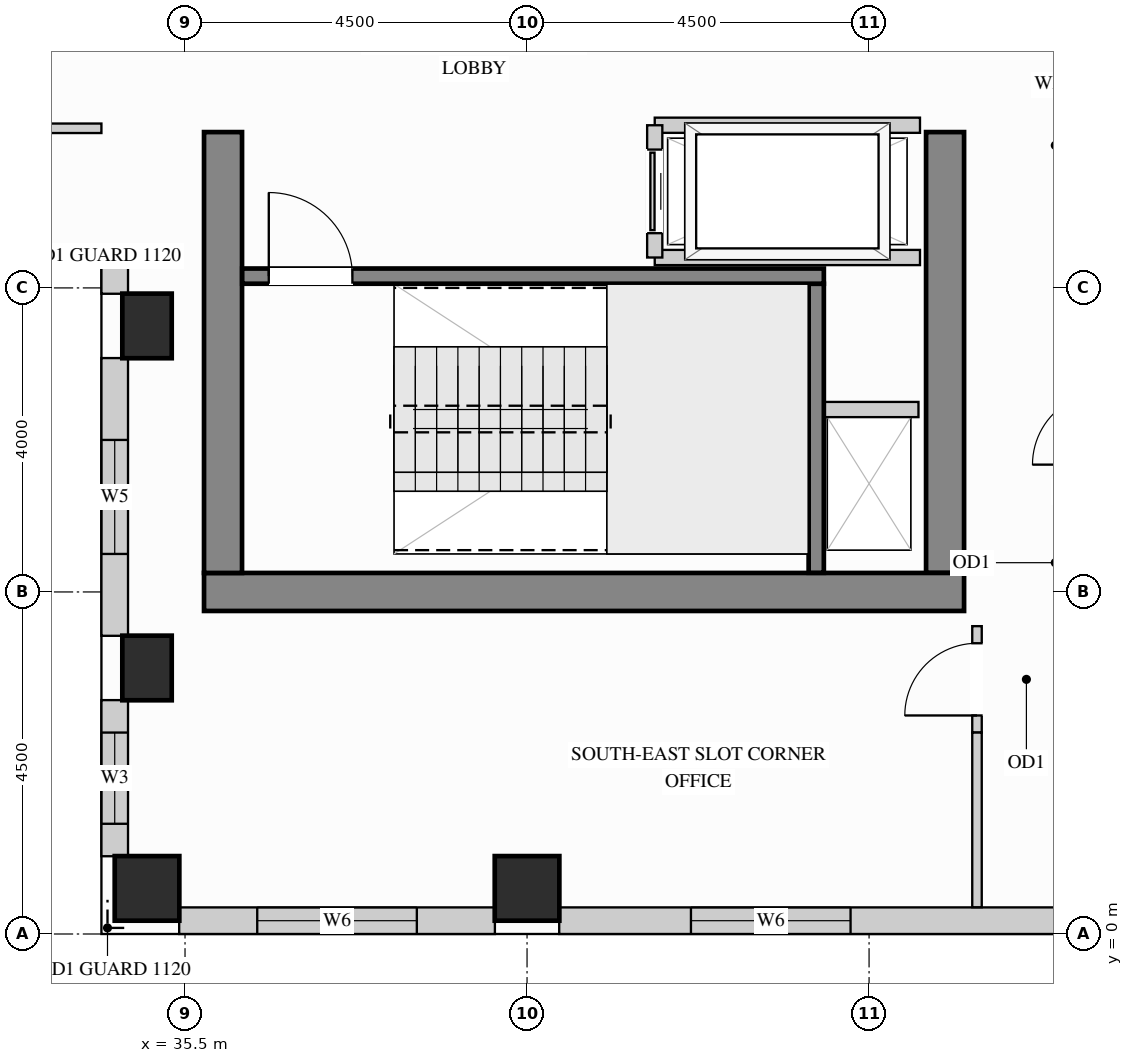
"""IFC4 building model, lengths in metres.
Left out: names, types, materials, properties, quantities, classifications, styles, units other than length and angle.
Written with IfcOpenShell. Run it as: python <this file> out.ifc"""

import sys

from ifc_helpers import new_model, si_unit, direction, frame, frame_2d, origin, origin_2d, place, context, subcontext, project, spatial, rectangle, extrude, source, transform, mapped, element, fill, save


model = new_model("IFC4")
c1 = context("Model", 3, precision=1e-05, world=origin(), true_north=direction((0.0, 1.0)))
c2 = subcontext(c1, "Body", "Model", "MODEL_VIEW")
j1 = project(units=[si_unit("LENGTHUNIT", "METRE"), si_unit("PLANEANGLEUNIT", "RADIAN")], contexts=[c1])
p1 = place(None, origin())
s1 = spatial("IfcSite", under=j1, at=p1, CompositionType="ELEMENT")
p2 = place(p1, origin())
s2 = spatial("IfcBuilding", under=s1, at=p2, CompositionType="ELEMENT")
p3 = place(p2, frame((0.0, 0.0, 244.8)))
s3 = spatial("IfcBuildingStorey", under=s2, at=p3, CompositionType="ELEMENT", Elevation=244.8)
m1 = source(origin(), c2, "Body", "SweptSolid", [
    extrude(rectangle(XDim=0.65, YDim=0.85, at=origin_2d()), origin(), (0.0, 0.0, 1.0), 3.4),
])
for number, where, z_axis, x_axis in (
    (1, (35.0, 3.5, 0.0), (0.0, 0.0, 1.0), (1.0, 0.0, 0.0)),
    (2, (35.0, 8.0, 0.0), (0.0, 0.0, 1.0), (1.0, 0.0, 0.0)),
):
    element("IfcColumn", number, at=place(p3, frame(where, z_axis=z_axis, x_axis=x_axis)), inside=s3, PredefinedType="COLUMN", context=c2, shape_type="MappedRepresentation", body=[
        mapped(m1, transform((0.0, 0.0, 0.0), x_axis=(1.0, 0.0, 0.0), y_axis=(0.0, 1.0, 0.0), z_axis=(0.0, 0.0, 1.0))),
    ])
m2 = source(origin(), c2, "Body", "SweptSolid", [
    extrude(rectangle(XDim=0.85, YDim=0.85, at=origin_2d()), origin(), (0.0, 0.0, 1.0), 3.4),
])
for number, where, z_axis, x_axis in (
    (3, (35.0, 0.6, 0.0), (0.0, 0.0, 1.0), (1.0, 0.0, 0.0)),
    (4, (40.0, 0.6, 0.0), (0.0, 0.0, 1.0), (1.0, 0.0, 0.0)),
):
    element("IfcColumn", number, at=place(p3, frame(where, z_axis=z_axis, x_axis=x_axis)), inside=s3, PredefinedType="COLUMN", context=c2, shape_type="MappedRepresentation", body=[
        mapped(m2, transform((0.0, 0.0, 0.0), x_axis=(1.0, 0.0, 0.0), y_axis=(0.0, 1.0, 0.0), z_axis=(0.0, 0.0, 1.0))),
    ])
m3 = source(origin(), c2, "Body", "SweptSolid", [
    extrude(rectangle(XDim=5.8, YDim=0.5, at=frame_2d((2.9, 0.0))), origin(), (0.0, 0.0, 1.0), 3.4),
])
p4 = place(p3, frame((45.5, 4.75, 0.0), z_axis=(0.0, 0.0, 1.0), x_axis=(0.0, 1.0, 0.0)))
e5 = element("IfcWall", 5, at=p4, inside=s3, PredefinedType="SHEAR", context=c2, shape_type="MappedRepresentation", body=[
    mapped(m3, transform((0.0, 0.0, 0.0), x_axis=(1.0, 0.0, 0.0), y_axis=(0.0, 1.0, 0.0), z_axis=(0.0, 0.0, 1.0))),
])
m4 = source(origin(), c2, "Body", "SweptSolid", [
    extrude(rectangle(XDim=10.0, YDim=0.5, at=frame_2d((5.0, 0.0))), origin(), (0.0, 0.0, 1.0), 3.4),
])
p5 = place(p3, frame((35.75, 4.5, 0.0), z_axis=(0.0, 0.0, 1.0), x_axis=(1.0, 0.0, 0.0)))
e6 = element("IfcWall", 6, at=p5, inside=s3, PredefinedType="SHEAR", context=c2, shape_type="MappedRepresentation", body=[
    mapped(m4, transform((0.0, 0.0, 0.0), x_axis=(1.0, 0.0, 0.0), y_axis=(0.0, 1.0, 0.0), z_axis=(0.0, 0.0, 1.0))),
])
p6 = place(p3, frame((36.0, 4.75, 0.0), z_axis=(0.0, 0.0, 1.0), x_axis=(0.0, 1.0, 0.0)))
e7 = element("IfcWall", 7, at=p6, inside=s3, PredefinedType="SHEAR", context=c2, shape_type="MappedRepresentation", body=[
    mapped(m3, transform((0.0, 0.0, 0.0), x_axis=(1.0, 0.0, 0.0), y_axis=(0.0, 1.0, 0.0), z_axis=(0.0, 0.0, 1.0))),
])
m5 = source(origin(), c2, "Body", "SweptSolid", [
    extrude(rectangle(XDim=0.379, YDim=0.35, at=frame_2d((0.189, 0.0))), origin(), (0.0, 0.0, 1.0), 3.385),
])
p7 = place(p3, frame((34.575, 8.802, 0.0), z_axis=(0.0, 0.0, 1.0), x_axis=(0.0, -1.0, 0.0)))
e8 = element("IfcWall", 8, at=p7, inside=s3, PredefinedType="SOLIDWALL", context=c2, shape_type="MappedRepresentation", body=[
    mapped(m5, transform((0.0, 0.0, 0.0), x_axis=(1.0, 0.0, 0.0), y_axis=(0.0, 1.0, 0.0), z_axis=(0.0, 0.0, 1.0))),
])
p8 = place(p3, frame((34.575, 7.577, 0.0), z_axis=(0.0, 0.0, 1.0), x_axis=(0.0, -1.0, 0.0)))
e9 = element("IfcWall", 9, at=p8, inside=s3, PredefinedType="SOLIDWALL", context=c2, shape_type="SweptSolid", body=[
    extrude(rectangle(XDim=3.654, YDim=0.35, at=frame_2d((1.827, 0.0))), origin(), (0.0, 0.0, 1.0), 3.385),
])
p9 = place(p8, frame((1.077, 0.0, 0.78)))
e10 = element("IfcOpeningElement", 10, at=p9, cuts=e9, PredefinedType="OPENING", context=c2, shape_type="SweptSolid", body=[
    extrude(rectangle(XDim=1.5, YDim=2.0, at=frame_2d((0.75, 1.0))), frame((0.0, 0.185, 0.0), z_axis=(0.0, -1.0, 0.0), x_axis=(1.0, 0.0, 0.0)), (0.0, 0.0, 1.0), 0.37),
])
p10 = place(p3, frame((34.575, 3.077, 0.0), z_axis=(0.0, 0.0, 1.0), x_axis=(0.0, -1.0, 0.0)))
e11 = element("IfcWall", 11, at=p10, inside=s3, PredefinedType="SOLIDWALL", context=c2, shape_type="SweptSolid", body=[
    extrude(rectangle(XDim=2.054, YDim=0.35, at=frame_2d((1.027, 0.0))), origin(), (0.0, 0.0, 1.0), 3.385),
])
p11 = place(p10, frame((0.427, 0.0, 0.78)))
e12 = element("IfcOpeningElement", 12, at=p11, cuts=e11, PredefinedType="OPENING", context=c2, shape_type="SweptSolid", body=[
    extrude(rectangle(XDim=1.2, YDim=2.0, at=frame_2d((0.6, 1.0))), frame((0.0, 0.185, 0.0), z_axis=(0.0, -1.0, 0.0), x_axis=(1.0, 0.0, 0.0)), (0.0, 0.0, 1.0), 0.37),
])
p12 = place(p3, frame((35.423, 0.175, 0.0), z_axis=(0.0, 0.0, 1.0), x_axis=(1.0, 0.0, 0.0)))
e13 = element("IfcWall", 13, at=p12, inside=s3, PredefinedType="SOLIDWALL", context=c2, shape_type="SweptSolid", body=[
    extrude(rectangle(XDim=4.154, YDim=0.35, at=frame_2d((2.077, 0.0))), origin(), (0.0, 0.0, 1.0), 3.385),
])
p13 = place(p12, frame((1.027, 0.0, 0.78)))
e14 = element("IfcOpeningElement", 14, at=p13, cuts=e13, PredefinedType="OPENING", context=c2, shape_type="SweptSolid", body=[
    extrude(rectangle(XDim=2.1, YDim=2.25, at=frame_2d((1.05, 1.125))), frame((0.0, 0.185, 0.0), z_axis=(0.0, -1.0, 0.0), x_axis=(1.0, 0.0, 0.0)), (0.0, 0.0, 1.0), 0.37),
])
p14 = place(p3, frame((40.423, 0.175, 0.0), z_axis=(0.0, 0.0, 1.0), x_axis=(1.0, 0.0, 0.0)))
e15 = element("IfcWall", 15, at=p14, inside=s3, PredefinedType="SOLIDWALL", context=c2, shape_type="SweptSolid", body=[
    extrude(rectangle(XDim=7.077, YDim=0.35, at=frame_2d((3.539, 0.0))), origin(), (0.0, 0.0, 1.0), 3.385),
])
p15 = place(p14, frame((1.733, 0.0, 0.78)))
e16 = element("IfcOpeningElement", 16, at=p15, cuts=e15, PredefinedType="OPENING", context=c2, shape_type="SweptSolid", body=[
    extrude(rectangle(XDim=2.1, YDim=2.25, at=frame_2d((1.05, 1.125))), frame((0.0, 0.185, 0.0), z_axis=(0.0, -1.0, 0.0), x_axis=(1.0, 0.0, 0.0)), (0.0, 0.0, 1.0), 0.37),
])
p16 = place(p3, frame((45.92, 2.65, 0.0), z_axis=(0.0, 0.0, 1.0), x_axis=(0.0, 1.0, 0.0)))
e17 = element("IfcWall", 17, at=p16, inside=s3, PredefinedType="PARTITIONING", context=c2, shape_type="SweptSolid", body=[
    extrude(rectangle(XDim=1.4, YDim=0.125, at=frame_2d((0.7, 0.0))), origin(), (0.0, 0.0, 1.0), 3.385),
])
p17 = place(p16, frame((0.225, 0.0, 0.0)))
e18 = element("IfcOpeningElement", 18, at=p17, cuts=e17, PredefinedType="OPENING", context=c2, shape_type="SweptSolid", body=[
    extrude(rectangle(XDim=0.95, YDim=2.15, at=frame_2d((0.475, 1.075))), frame((0.0, 0.073, 0.0), z_axis=(0.0, -1.0, 0.0), x_axis=(1.0, 0.0, 0.0)), (0.0, 0.0, 1.0), 0.145),
])
m6 = source(origin(), c2, "Body", "SweptSolid", [
    extrude(rectangle(XDim=2.298, YDim=0.125, at=frame_2d((1.149, 0.0))), origin(), (0.0, 0.0, 1.0), 3.385),
])
p18 = place(p3, frame((45.92, 0.352, 0.0), z_axis=(0.0, 0.0, 1.0), x_axis=(0.0, 1.0, 0.0)))
e19 = element("IfcWall", 19, at=p18, inside=s3, PredefinedType="PARTITIONING", context=c2, shape_type="MappedRepresentation", body=[
    mapped(m6, transform((0.0, 0.0, 0.0), x_axis=(1.0, 0.0, 0.0), y_axis=(0.0, 1.0, 0.0), z_axis=(0.0, 0.0, 1.0))),
])
p19 = place(p3, frame((19.5, 10.6, 0.0), z_axis=(0.0, 0.0, 1.0), x_axis=(1.0, 0.0, 0.0)))
e20 = element("IfcWall", 20, at=p19, inside=s3, PredefinedType="PARTITIONING", context=c2, shape_type="SweptSolid", body=[
    extrude(rectangle(XDim=14.9, YDim=0.125, at=frame_2d((7.45, 0.0))), origin(), (0.0, 0.0, 1.0), 3.385),
])
p20 = place(p19, frame((6.975, 0.0, 0.0)))
e21 = element("IfcOpeningElement", 21, at=p20, cuts=e20, PredefinedType="OPENING", context=c2, shape_type="SweptSolid", body=[
    extrude(rectangle(XDim=0.95, YDim=2.15, at=frame_2d((0.475, 1.075))), frame((0.0, 0.073, 0.0), z_axis=(0.0, -1.0, 0.0), x_axis=(1.0, 0.0, 0.0)), (0.0, 0.0, 1.0), 0.145),
])
m7 = source(origin(), c2, "Body", "SweptSolid", [
    extrude(rectangle(XDim=1.3, YDim=0.2, at=frame_2d((0.65, 0.0))), origin(), (0.0, 0.0, 1.0), 3.385),
])
p21 = place(p3, frame((43.85, 6.9, 0.0), z_axis=(0.0, 0.0, 1.0), x_axis=(1.0, 0.0, 0.0)))
e22 = element("IfcWall", 22, at=p21, inside=s3, PredefinedType="PARTITIONING", context=c2, shape_type="MappedRepresentation", body=[
    mapped(m7, transform((0.0, 0.0, 0.0), x_axis=(1.0, 0.0, 0.0), y_axis=(0.0, 1.0, 0.0), z_axis=(0.0, 0.0, 1.0))),
])
m8 = source(origin(), c2, "Body", "SweptSolid", [
    extrude(rectangle(XDim=3.49, YDim=0.2, at=frame_2d((1.745, 0.0))), origin(), (0.0, 0.0, 1.0), 3.385),
])
for number, where, z_axis, x_axis in (
    (23, (41.68, 10.64, 0.0), (0.0, 0.0, 1.0), (1.0, 0.0, 0.0)),
    (24, (41.68, 8.9, 0.0), (0.0, 0.0, 1.0), (1.0, 0.0, 0.0)),
):
    element("IfcWall", number, at=place(p3, frame(where, z_axis=z_axis, x_axis=x_axis)), inside=s3, PredefinedType="PARTITIONING", context=c2, shape_type="MappedRepresentation", body=[
        mapped(m8, transform((0.0, 0.0, 0.0), x_axis=(1.0, 0.0, 0.0), y_axis=(0.0, 1.0, 0.0), z_axis=(0.0, 0.0, 1.0))),
    ])
p22 = place(p3, frame((41.68, 8.9, 0.0), z_axis=(0.0, 0.0, 1.0), x_axis=(0.0, 1.0, 0.0)))
e25 = element("IfcWall", 25, at=p22, inside=s3, PredefinedType="PARTITIONING", context=c2, shape_type="SweptSolid", body=[
    extrude(rectangle(XDim=1.74, YDim=0.2, at=frame_2d((0.87, 0.0))), origin(), (0.0, 0.0, 1.0), 3.385),
])
p23 = place(p22, frame((0.32, 0.0, 0.0)))
e26 = element("IfcOpeningElement", 26, at=p23, cuts=e25, PredefinedType="OPENING", context=c2, shape_type="SweptSolid", body=[
    extrude(rectangle(XDim=1.1, YDim=2.2, at=frame_2d((0.55, 1.1))), frame((0.0, 0.11, 0.0), z_axis=(0.0, -1.0, 0.0), x_axis=(1.0, 0.0, 0.0)), (0.0, 0.0, 1.0), 0.22),
])
m9 = source(origin(), c2, "Body", "SweptSolid", [
    extrude(rectangle(XDim=3.803, YDim=0.2, at=frame_2d((1.901, 0.0))), origin(), (0.0, 0.0, 1.0), 3.4),
])
p24 = place(p3, frame((43.805, 4.752, 0.0), z_axis=(0.0, 0.0, 1.0), x_axis=(0.0, 1.0, 0.0)))
e27 = element("IfcWall", 27, at=p24, inside=s3, PredefinedType="SHEAR", context=c2, shape_type="MappedRepresentation", body=[
    mapped(m9, transform((0.0, 0.0, 0.0), x_axis=(1.0, 0.0, 0.0), y_axis=(0.0, 1.0, 0.0), z_axis=(0.0, 0.0, 1.0))),
])
p25 = place(p3, frame((36.252, 8.655, 0.0), z_axis=(0.0, 0.0, 1.0), x_axis=(1.0, 0.0, 0.0)))
e28 = element("IfcWall", 28, at=p25, inside=s3, PredefinedType="SHEAR", context=c2, shape_type="SweptSolid", body=[
    extrude(rectangle(XDim=7.653, YDim=0.2, at=frame_2d((3.827, 0.0))), origin(), (0.0, 0.0, 1.0), 3.4),
])
p26 = place(p25, frame((0.35, 0.0, 0.0)))
e29 = element("IfcOpeningElement", 29, at=p26, cuts=e28, PredefinedType="OPENING", context=c2, shape_type="SweptSolid", body=[
    extrude(rectangle(XDim=1.1, YDim=2.15, at=frame_2d((0.55, 1.075))), frame((0.0, 0.11, 0.0), z_axis=(0.0, -1.0, 0.0), x_axis=(1.0, 0.0, 0.0)), (0.0, 0.0, 1.0), 0.22),
])
m10 = source(origin(), c2, "Body", "SweptSolid", [
    extrude(rectangle(XDim=1.1, YDim=2.2, at=frame_2d((0.55, 1.1))), frame((0.0, 0.025, 0.0), z_axis=(0.0, -1.0, 0.0), x_axis=(1.0, 0.0, 0.0)), (0.0, 0.0, 1.0), 0.05),
])
p27 = place(p23, origin())
e30 = element("IfcDoor", 30, at=p27, inside=s3, OperationType="SLIDING_TO_LEFT", PredefinedType="DOOR", context=c2, shape_type="MappedRepresentation", body=[
    mapped(m10, transform((0.0, 0.0, 0.0), x_axis=(1.0, 0.0, 0.0), y_axis=(0.0, 1.0, 0.0), z_axis=(0.0, 0.0, 1.0))),
])
fill(e26, e30)
m11 = source(origin(), c2, "Body", "SweptSolid", [
    extrude(rectangle(XDim=0.95, YDim=2.15, at=frame_2d((0.475, 1.075))), frame((0.0, 0.025, 0.0), z_axis=(0.0, -1.0, 0.0), x_axis=(1.0, 0.0, 0.0)), (0.0, 0.0, 1.0), 0.05),
])
p28 = place(p17, origin())
e31 = element("IfcDoor", 31, at=p28, inside=s3, OperationType="SINGLE_SWING_LEFT", PredefinedType="DOOR", context=c2, shape_type="MappedRepresentation", body=[
    mapped(m11, transform((0.0, 0.0, 0.0), x_axis=(1.0, 0.0, 0.0), y_axis=(0.0, 1.0, 0.0), z_axis=(0.0, 0.0, 1.0))),
])
fill(e18, e31)
m12 = source(origin(), c2, "Body", "SweptSolid", [
    extrude(rectangle(XDim=1.1, YDim=2.15, at=frame_2d((0.55, 1.075))), frame((0.0, 0.025, 0.0), z_axis=(0.0, -1.0, 0.0), x_axis=(1.0, 0.0, 0.0)), (0.0, 0.0, 1.0), 0.05),
])
p29 = place(p26, origin())
e32 = element("IfcDoor", 32, at=p29, inside=s3, OperationType="SINGLE_SWING_LEFT", PredefinedType="DOOR", context=c2, shape_type="MappedRepresentation", body=[
    mapped(m12, transform((0.0, 0.0, 0.0), x_axis=(1.0, 0.0, 0.0), y_axis=(0.0, 1.0, 0.0), z_axis=(0.0, 0.0, 1.0))),
])
fill(e29, e32)
m13 = source(origin(), c2, "Body", "SweptSolid", [
    extrude(rectangle(XDim=1.2, YDim=2.0, at=frame_2d((0.6, 1.0))), frame((0.0, 0.03, 0.0), z_axis=(0.0, -1.0, 0.0), x_axis=(1.0, 0.0, 0.0)), (0.0, 0.0, 1.0), 0.06),
])
p30 = place(p11, origin())
e33 = element("IfcWindow", 33, at=p30, inside=s3, PartitioningType="SINGLE_PANEL", PredefinedType="WINDOW", context=c2, shape_type="MappedRepresentation", body=[
    mapped(m13, transform((0.0, 0.0, 0.0), x_axis=(1.0, 0.0, 0.0), y_axis=(0.0, 1.0, 0.0), z_axis=(0.0, 0.0, 1.0))),
])
fill(e12, e33)
m14 = source(origin(), c2, "Body", "SweptSolid", [
    extrude(rectangle(XDim=1.5, YDim=2.0, at=frame_2d((0.75, 1.0))), frame((0.0, 0.03, 0.0), z_axis=(0.0, -1.0, 0.0), x_axis=(1.0, 0.0, 0.0)), (0.0, 0.0, 1.0), 0.06),
])
p31 = place(p9, origin())
e34 = element("IfcWindow", 34, at=p31, inside=s3, PartitioningType="SINGLE_PANEL", PredefinedType="WINDOW", context=c2, shape_type="MappedRepresentation", body=[
    mapped(m14, transform((0.0, 0.0, 0.0), x_axis=(1.0, 0.0, 0.0), y_axis=(0.0, 1.0, 0.0), z_axis=(0.0, 0.0, 1.0))),
])
fill(e10, e34)
m15 = source(origin(), c2, "Body", "SweptSolid", [
    extrude(rectangle(XDim=2.1, YDim=2.25, at=frame_2d((1.05, 1.125))), frame((0.0, 0.03, 0.0), z_axis=(0.0, -1.0, 0.0), x_axis=(1.0, 0.0, 0.0)), (0.0, 0.0, 1.0), 0.06),
])
p32 = place(p13, origin())
e35 = element("IfcWindow", 35, at=p32, inside=s3, PartitioningType="SINGLE_PANEL", PredefinedType="WINDOW", context=c2, shape_type="MappedRepresentation", body=[
    mapped(m15, transform((0.0, 0.0, 0.0), x_axis=(1.0, 0.0, 0.0), y_axis=(0.0, 1.0, 0.0), z_axis=(0.0, 0.0, 1.0))),
])
fill(e14, e35)
p33 = place(p15, origin())
e36 = element("IfcWindow", 36, at=p33, inside=s3, PartitioningType="SINGLE_PANEL", PredefinedType="WINDOW", context=c2, shape_type="MappedRepresentation", body=[
    mapped(m15, transform((0.0, 0.0, 0.0), x_axis=(1.0, 0.0, 0.0), y_axis=(0.0, 1.0, 0.0), z_axis=(0.0, 0.0, 1.0))),
])
fill(e16, e36)
save(model, sys.argv[1])
